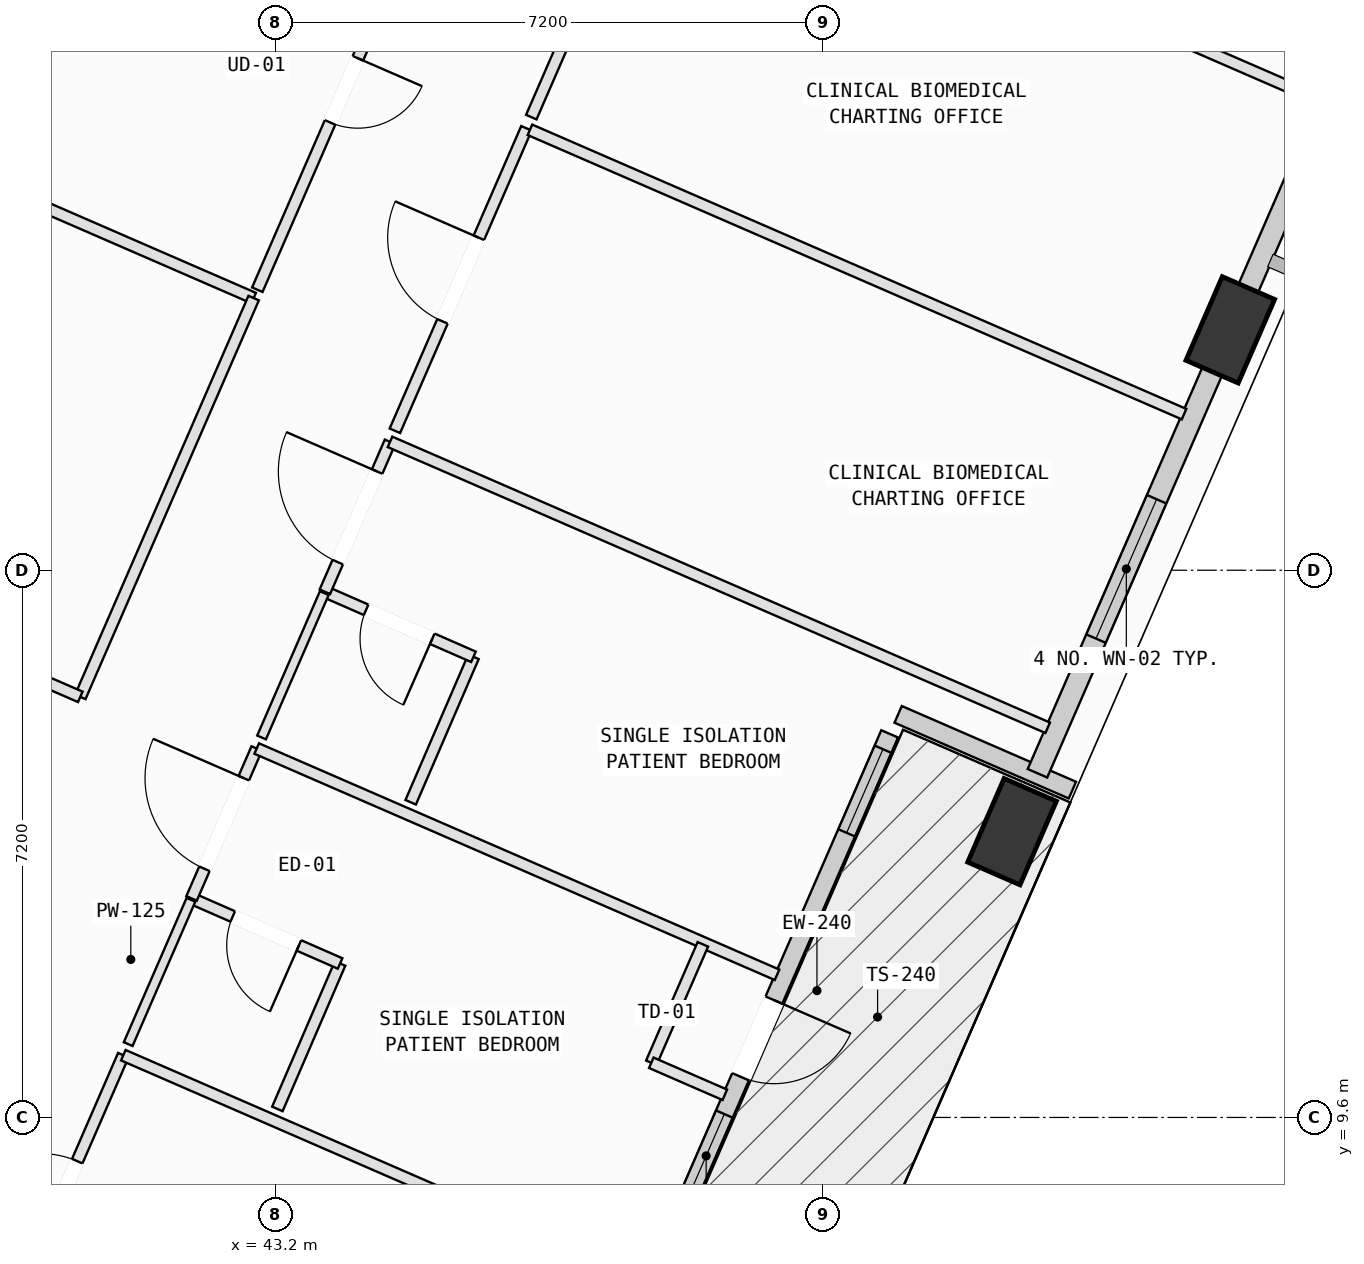
"""IFC4 building model, lengths in metres.
Left out: names, types, materials, properties, quantities, classifications, styles, units other than length and angle.
Written with IfcOpenShell. Run it as: python <this file> out.ifc"""

import sys

from ifc_helpers import new_model, si_unit, direction, frame, frame_2d, origin, origin_2d, place, context, subcontext, project, spatial, rectangle, extrude, element, fill, save


model = new_model("IFC4")
c1 = context("Model", 3, precision=1e-05, world=origin(), true_north=direction((0.0, 1.0)))
c2 = subcontext(c1, "Body", "Model", "MODEL_VIEW")
j1 = project(units=[si_unit("LENGTHUNIT", "METRE"), si_unit("PLANEANGLEUNIT", "RADIAN")], contexts=[c1])
p1 = place(None, origin())
s1 = spatial("IfcSite", under=j1, at=p1, CompositionType="ELEMENT")
p2 = place(p1, origin())
s2 = spatial("IfcBuilding", under=s1, at=p2, CompositionType="ELEMENT")
p3 = place(p2, frame((0.0, 0.0, 324.6)))
s3 = spatial("IfcBuildingStorey", under=s2, at=p3, CompositionType="ELEMENT", Elevation=324.6)
for number, where, z_axis, x_axis in (
    (1, (52.888, 13.36, 0.002), (0.0, 0.0, 1.0), (0.399, 0.917, 0.0)),
    (2, (55.759, 19.963, 0.002), (0.0, 0.0, 1.0), (0.399, 0.917, 0.0)),
):
    element("IfcColumn", number, at=place(p3, frame(where, z_axis=z_axis, x_axis=x_axis)), inside=s3, PredefinedType="COLUMN", context=c2, shape_type="SweptSolid", body=[
        extrude(rectangle(XDim=1.2, YDim=0.75, at=origin_2d()), origin(), (0.0, 0.0, 1.0), 3.996),
    ])
p4 = place(p3, frame((51.278, 14.647, 0.0), z_axis=(0.0, 0.0, 1.0), x_axis=(-0.398727394062, -0.917069498579, 0.0)))
e3 = element("IfcWall", 3, at=p4, inside=s3, PredefinedType="SOLIDWALL", context=c2, shape_type="SweptSolid", body=[
    extrude(rectangle(XDim=6.96, YDim=0.24, at=frame_2d((3.48, 0.0))), origin(), (0.0, 0.0, 1.0), 3.265),
])
p5 = place(p4, frame((3.82, 0.0, 0.0)))
e4 = element("IfcOpeningElement", 4, at=p5, cuts=e3, PredefinedType="OPENING", context=c2, shape_type="SweptSolid", body=[
    extrude(rectangle(XDim=1.1, YDim=2.15, at=frame_2d((0.55, 1.075))), frame((0.0, 0.13, 0.0), z_axis=(0.0, -1.0, 0.0), x_axis=(1.0, 0.0, 0.0)), (0.0, 0.0, 1.0), 0.26),
])
p6 = place(p4, frame((5.455, 0.0, 0.75)))
e5 = element("IfcOpeningElement", 5, at=p6, cuts=e3, PredefinedType="OPENING", context=c2, shape_type="SweptSolid", body=[
    extrude(rectangle(XDim=1.2, YDim=1.75, at=frame_2d((0.6, 0.875))), frame((0.0, 0.13, 0.0), z_axis=(0.0, -1.0, 0.0), x_axis=(1.0, 0.0, 0.0)), (0.0, 0.0, 1.0), 0.26),
])
p7 = place(p4, frame((0.22, 0.0, 0.75)))
e6 = element("IfcOpeningElement", 6, at=p7, cuts=e3, PredefinedType="OPENING", context=c2, shape_type="SweptSolid", body=[
    extrude(rectangle(XDim=1.2, YDim=1.75, at=frame_2d((0.6, 0.875))), frame((0.0, 0.13, 0.0), z_axis=(0.0, -1.0, 0.0), x_axis=(1.0, 0.0, 0.0)), (0.0, 0.0, 1.0), 0.26),
])
p8 = place(p3, frame((53.682, 13.907, 0.0), z_axis=(0.0, 0.0, 1.0), x_axis=(-0.917056081644, 0.398758251475, 0.0)))
e7 = element("IfcWall", 7, at=p8, inside=s3, PredefinedType="SOLIDWALL", context=c2, shape_type="SweptSolid", body=[
    extrude(rectangle(XDim=2.5, YDim=0.24, at=frame_2d((1.25, 0.0))), origin(), (0.0, 0.0, 1.0), 3.265),
])
p9 = place(p3, frame((55.601, 19.598, 0.0), z_axis=(0.0, 0.0, 1.0), x_axis=(-0.398765026274, -0.917053135767, 0.0)))
e8 = element("IfcWall", 8, at=p9, inside=s3, PredefinedType="SOLIDWALL", context=c2, shape_type="SweptSolid", body=[
    extrude(rectangle(XDim=5.964, YDim=0.28, at=frame_2d((2.982, 0.0))), origin(), (0.0, 0.0, 1.0), 3.265),
])
p10 = place(p9, frame((2.032, 0.0, 0.75)))
e9 = element("IfcOpeningElement", 9, at=p10, cuts=e8, PredefinedType="OPENING", context=c2, shape_type="SweptSolid", body=[
    extrude(rectangle(XDim=2.0, YDim=1.95, at=frame_2d((1.0, 0.975))), frame((0.0, 0.15, 0.0), z_axis=(0.0, -1.0, 0.0), x_axis=(1.0, 0.0, 0.0)), (0.0, 0.0, 1.0), 0.3),
])
p11 = place(p3, frame((58.472, 26.201, 0.0), z_axis=(0.0, 0.0, 1.0), x_axis=(-0.398776286617, -0.917048239316, 0.0)))
e10 = element("IfcWall", 10, at=p11, inside=s3, PredefinedType="SOLIDWALL", context=c2, shape_type="SweptSolid", body=[
    extrude(rectangle(XDim=6.405, YDim=0.28, at=frame_2d((3.203, 0.0))), origin(), (0.0, 0.0, 1.0), 3.265),
])
p12 = place(p11, frame((0.896, 0.0, 0.75)))
e11 = element("IfcOpeningElement", 11, at=p12, cuts=e10, PredefinedType="OPENING", context=c2, shape_type="SweptSolid", body=[
    extrude(rectangle(XDim=1.4, YDim=1.85, at=frame_2d((0.7, 0.925))), frame((0.0, 0.15, 0.0), z_axis=(0.0, -1.0, 0.0), x_axis=(1.0, 0.0, 0.0)), (0.0, 0.0, 1.0), 0.3),
])
p13 = place(p3, frame((39.505, 6.53, 0.0), z_axis=(0.0, 0.0, 1.0), x_axis=(0.398597683129, 0.917125883946, 0.0)))
e12 = element("IfcWall", 12, at=p13, inside=s3, PredefinedType="PARTITIONING", context=c2, shape_type="SweptSolid", body=[
    extrude(rectangle(XDim=4.24, YDim=0.15, at=frame_2d((2.12, 0.0))), origin(), (0.0, 0.0, 1.0), 3.78),
])
p14 = place(p13, frame((1.52, 0.0, 0.0)))
e13 = element("IfcOpeningElement", 13, at=p14, cuts=e12, PredefinedType="OPENING", context=c2, shape_type="SweptSolid", body=[
    extrude(rectangle(XDim=1.2, YDim=2.15, at=frame_2d((0.6, 1.075))), frame((0.0, 0.085, 0.0), z_axis=(0.0, -1.0, 0.0), x_axis=(1.0, 0.0, 0.0)), (0.0, 0.0, 1.0), 0.17),
])
p15 = place(p3, frame((41.195, 10.419, 0.0), z_axis=(0.0, 0.0, 1.0), x_axis=(0.917057356127, -0.398755320434, 0.0)))
e14 = element("IfcWall", 14, at=p15, inside=s3, PredefinedType="PARTITIONING", context=c2, shape_type="SweptSolid", body=[
    extrude(rectangle(XDim=9.78, YDim=0.15, at=frame_2d((4.89, 0.0))), origin(), (0.0, 0.0, 1.0), 2.765),
])
p16 = place(p3, frame((43.222, 9.712, 0.0), z_axis=(0.0, 0.0, 1.0), x_axis=(0.395897468888, 0.918294720734, 0.0)))
e15 = element("IfcWall", 15, at=p16, inside=s3, PredefinedType="PARTITIONING", context=c2, shape_type="SweptSolid", body=[
    extrude(rectangle(XDim=2.084, YDim=0.15, at=frame_2d((1.042, 0.0))), origin(), (0.0, 0.0, 1.0), 3.415),
])
p17 = place(p3, frame((44.047, 11.626, 0.0), z_axis=(0.0, 0.0, 1.0), x_axis=(-0.915978642335, 0.40122702649, 0.0)))
e16 = element("IfcWall", 16, at=p17, inside=s3, PredefinedType="PARTITIONING", context=c2, shape_type="SweptSolid", body=[
    extrude(rectangle(XDim=2.133, YDim=0.15, at=frame_2d((1.067, 0.0))), origin(), (0.0, 0.0, 1.0), 3.78),
])
p18 = place(p17, frame((0.592, 0.0, 0.0)))
e17 = element("IfcOpeningElement", 17, at=p18, cuts=e16, PredefinedType="OPENING", context=c2, shape_type="SweptSolid", body=[
    extrude(rectangle(XDim=0.95, YDim=2.1, at=frame_2d((0.475, 1.05))), frame((0.0, 0.085, 0.0), z_axis=(0.0, -1.0, 0.0), x_axis=(1.0, 0.0, 0.0)), (0.0, 0.0, 1.0), 0.17),
])
p19 = place(p3, frame((42.093, 12.482, 0.0), z_axis=(0.0, 0.0, 1.0), x_axis=(0.398518519728, 0.917160285574, 0.0)))
e18 = element("IfcWall", 18, at=p19, inside=s3, PredefinedType="PARTITIONING", context=c2, shape_type="SweptSolid", body=[
    extrude(rectangle(XDim=2.15, YDim=0.15, at=frame_2d((1.075, 0.0))), origin(), (0.0, 0.0, 1.0), 3.78),
])
p20 = place(p19, frame((0.425, 0.0, 0.0)))
e19 = element("IfcOpeningElement", 19, at=p20, cuts=e18, PredefinedType="OPENING", context=c2, shape_type="SweptSolid", body=[
    extrude(rectangle(XDim=1.3, YDim=2.15, at=frame_2d((0.65, 1.075))), frame((0.0, 0.085, 0.0), z_axis=(0.0, -1.0, 0.0), x_axis=(1.0, 0.0, 0.0)), (0.0, 0.0, 1.0), 0.17),
])
p21 = place(p3, frame((42.95, 14.454, 0.0), z_axis=(0.0, 0.0, 1.0), x_axis=(0.917043017742, -0.398788294224, 0.0)))
e20 = element("IfcWall", 20, at=p21, inside=s3, PredefinedType="PARTITIONING", context=c2, shape_type="SweptSolid", body=[
    extrude(rectangle(XDim=7.465, YDim=0.15, at=frame_2d((3.733, 0.0))), origin(), (0.0, 0.0, 1.0), 3.78),
])
p22 = place(p3, frame((48.82, 11.878, 0.0), z_axis=(0.0, 0.0, 1.0), x_axis=(-0.398836393262, -0.917022099739, 0.0)))
e21 = element("IfcWall", 21, at=p22, inside=s3, PredefinedType="PARTITIONING", context=c2, shape_type="SweptSolid", body=[
    extrude(rectangle(XDim=1.7, YDim=0.15, at=frame_2d((0.85, 0.0))), origin(), (0.0, 0.0, 1.0), 3.78),
])
p23 = place(p3, frame((48.142, 10.319, 0.0), z_axis=(0.0, 0.0, 1.0), x_axis=(0.916793786887, -0.399360929894, 0.0)))
e22 = element("IfcWall", 22, at=p23, inside=s3, PredefinedType="PARTITIONING", context=c2, shape_type="SweptSolid", body=[
    extrude(rectangle(XDim=1.054, YDim=0.15, at=frame_2d((0.527, 0.0))), origin(), (0.0, 0.0, 1.0), 3.78),
])
p24 = place(p3, frame((41.259, 10.565, 0.0), z_axis=(0.0, 0.0, 1.0), x_axis=(0.398808011477, 0.917034443182, 0.0)))
e23 = element("IfcWall", 23, at=p24, inside=s3, PredefinedType="PARTITIONING", context=c2, shape_type="SweptSolid", body=[
    extrude(rectangle(XDim=2.071, YDim=0.125, at=frame_2d((1.036, 0.0))), origin(), (0.0, 0.0, 1.0), 3.78),
])
p25 = place(p3, frame((44.976, 13.747, 0.0), z_axis=(0.0, 0.0, 1.0), x_axis=(0.396236327193, 0.918148557159, 0.0)))
e24 = element("IfcWall", 24, at=p25, inside=s3, PredefinedType="PARTITIONING", context=c2, shape_type="SweptSolid", body=[
    extrude(rectangle(XDim=2.084, YDim=0.15, at=frame_2d((1.042, 0.0))), origin(), (0.0, 0.0, 1.0), 3.78),
])
p26 = place(p3, frame((45.802, 15.661, 0.0), z_axis=(0.0, 0.0, 1.0), x_axis=(-0.916010257987, 0.401154842003, 0.0)))
e25 = element("IfcWall", 25, at=p26, inside=s3, PredefinedType="PARTITIONING", context=c2, shape_type="SweptSolid", body=[
    extrude(rectangle(XDim=2.134, YDim=0.15, at=frame_2d((1.067, 0.0))), origin(), (0.0, 0.0, 1.0), 3.78),
])
p27 = place(p26, frame((0.592, 0.0, 0.0)))
e26 = element("IfcOpeningElement", 26, at=p27, cuts=e25, PredefinedType="OPENING", context=c2, shape_type="SweptSolid", body=[
    extrude(rectangle(XDim=0.95, YDim=2.1, at=frame_2d((0.475, 1.05))), frame((0.0, 0.085, 0.0), z_axis=(0.0, -1.0, 0.0), x_axis=(1.0, 0.0, 0.0)), (0.0, 0.0, 1.0), 0.17),
])
p28 = place(p3, frame((43.847, 16.517, 0.0), z_axis=(0.0, 0.0, 1.0), x_axis=(0.398655528378, 0.917100741301, 0.0)))
e27 = element("IfcWall", 27, at=p28, inside=s3, PredefinedType="PARTITIONING", context=c2, shape_type="SweptSolid", body=[
    extrude(rectangle(XDim=2.15, YDim=0.15, at=frame_2d((1.075, 0.0))), origin(), (0.0, 0.0, 1.0), 3.78),
])
p29 = place(p28, frame((0.425, 0.0, 0.0)))
e28 = element("IfcOpeningElement", 28, at=p29, cuts=e27, PredefinedType="OPENING", context=c2, shape_type="SweptSolid", body=[
    extrude(rectangle(XDim=1.3, YDim=2.15, at=frame_2d((0.65, 1.075))), frame((0.0, 0.085, 0.0), z_axis=(0.0, -1.0, 0.0), x_axis=(1.0, 0.0, 0.0)), (0.0, 0.0, 1.0), 0.17),
])
p30 = place(p3, frame((44.704, 18.489, 0.0), z_axis=(0.0, 0.0, 1.0), x_axis=(0.917075404025, -0.398713811315, 0.0)))
e29 = element("IfcWall", 29, at=p30, inside=s3, PredefinedType="PARTITIONING", context=c2, shape_type="SweptSolid", body=[
    extrude(rectangle(XDim=9.435, YDim=0.15, at=frame_2d((4.718, 0.0))), origin(), (0.0, 0.0, 1.0), 3.78),
])
p31 = place(p3, frame((43.014, 14.6, 0.0), z_axis=(0.0, 0.0, 1.0), x_axis=(0.398553636867, 0.917145025904, 0.0)))
e30 = element("IfcWall", 30, at=p31, inside=s3, PredefinedType="PARTITIONING", context=c2, shape_type="SweptSolid", body=[
    extrude(rectangle(XDim=2.071, YDim=0.125, at=frame_2d((1.035, 0.0))), origin(), (0.0, 0.0, 1.0), 3.78),
])
p32 = place(p3, frame((44.768, 18.635, 0.0), z_axis=(0.0, 0.0, 1.0), x_axis=(0.398828954963, 0.91702533481, 0.0)))
e31 = element("IfcWall", 31, at=p32, inside=s3, PredefinedType="PARTITIONING", context=c2, shape_type="SweptSolid", body=[
    extrude(rectangle(XDim=4.34, YDim=0.15, at=frame_2d((2.17, 0.0))), origin(), (0.0, 0.0, 1.0), 3.415),
])
p33 = place(p32, frame((1.57, 0.0, 0.0)))
e32 = element("IfcOpeningElement", 32, at=p33, cuts=e31, PredefinedType="OPENING", context=c2, shape_type="SweptSolid", body=[
    extrude(rectangle(XDim=1.2, YDim=2.15, at=frame_2d((0.6, 1.075))), frame((0.0, 0.085, 0.0), z_axis=(0.0, -1.0, 0.0), x_axis=(1.0, 0.0, 0.0)), (0.0, 0.0, 1.0), 0.17),
])
p34 = place(p3, frame((46.545, 22.595, 0.0), z_axis=(0.0, 0.0, 1.0), x_axis=(0.917099421132, -0.39865856539, 0.0)))
e33 = element("IfcWall", 33, at=p34, inside=s3, PredefinedType="PARTITIONING", context=c2, shape_type="SweptSolid", body=[
    extrude(rectangle(XDim=9.384, YDim=0.15, at=frame_2d((4.692, 0.0))), origin(), (0.0, 0.0, 1.0), 3.78),
])
p35 = place(p3, frame((46.563, 22.762, 0.0), z_axis=(0.0, 0.0, 1.0), x_axis=(0.398639711207, 0.917107616722, 0.0)))
e34 = element("IfcWall", 34, at=p35, inside=s3, PredefinedType="PARTITIONING", context=c2, shape_type="SweptSolid", body=[
    extrude(rectangle(XDim=4.34, YDim=0.15, at=frame_2d((2.17, 0.0))), origin(), (0.0, 0.0, 1.0), 3.415),
])
p36 = place(p35, frame((1.57, 0.0, 0.0)))
e35 = element("IfcOpeningElement", 35, at=p36, cuts=e34, PredefinedType="OPENING", context=c2, shape_type="SweptSolid", body=[
    extrude(rectangle(XDim=1.2, YDim=2.15, at=frame_2d((0.6, 1.075))), frame((0.0, 0.085, 0.0), z_axis=(0.0, -1.0, 0.0), x_axis=(1.0, 0.0, 0.0)), (0.0, 0.0, 1.0), 0.17),
])
p37 = place(p3, frame((48.293, 26.742, 0.0), z_axis=(0.0, 0.0, 1.0), x_axis=(0.917063062267, -0.398742197197, 0.0)))
e36 = element("IfcWall", 36, at=p37, inside=s3, PredefinedType="PARTITIONING", context=c2, shape_type="SweptSolid", body=[
    extrude(rectangle(XDim=9.435, YDim=0.15, at=frame_2d((4.717, 0.0))), origin(), (0.0, 0.0, 1.0), 3.78),
])
p38 = place(p3, frame((56.128, 20.236, 0.0), z_axis=(0.0, 0.0, 1.0), x_axis=(-0.398658726612, -0.91709935105, 0.0)))
e37 = element("IfcWall", 37, at=p38, inside=s3, PredefinedType="PARTITIONING", context=c2, shape_type="SweptSolid", body=[
    extrude(rectangle(XDim=0.795, YDim=0.15, at=frame_2d((0.397, 0.0))), origin(), (0.0, 0.0, 1.0), 3.265),
])
p39 = place(p3, frame((34.808, 23.904, 0.0), z_axis=(0.0, 0.0, 1.0), x_axis=(0.917052481723, -0.398766530398, 0.0)))
e38 = element("IfcWall", 38, at=p39, inside=s3, PredefinedType="PARTITIONING", context=c2, shape_type="SweptSolid", body=[
    extrude(rectangle(XDim=8.835, YDim=0.15, at=frame_2d((4.417, 0.0))), origin(), (0.0, 0.0, 1.0), 3.78),
])
p40 = place(p3, frame((42.91, 20.381, 0.0), z_axis=(0.0, 0.0, 1.0), x_axis=(-0.398677741034, -0.917091085337, 0.0)))
e39 = element("IfcWall", 39, at=p40, inside=s3, PredefinedType="PARTITIONING", context=c2, shape_type="SweptSolid", body=[
    extrude(rectangle(XDim=5.721, YDim=0.15, at=frame_2d((2.861, 0.0))), origin(), (0.0, 0.0, 1.0), 3.78),
])
p41 = place(p3, frame((40.629, 15.134, 0.0), z_axis=(0.0, 0.0, 1.0), x_axis=(-0.916933705125, 0.399039572481, 0.0)))
e40 = element("IfcWall", 40, at=p41, inside=s3, PredefinedType="PARTITIONING", context=c2, shape_type="SweptSolid", body=[
    extrude(rectangle(XDim=1.253, YDim=0.15, at=frame_2d((0.626, 0.0))), origin(), (0.0, 0.0, 1.0), 3.78),
])
p42 = place(p3, frame((45.239, 25.738, 0.0), z_axis=(0.0, 0.0, 1.0), x_axis=(-0.398677741034, -0.917091085337, 0.0)))
e41 = element("IfcWall", 41, at=p42, inside=s3, PredefinedType="PARTITIONING", context=c2, shape_type="SweptSolid", body=[
    extrude(rectangle(XDim=5.721, YDim=0.15, at=frame_2d((2.861, 0.0))), origin(), (0.0, 0.0, 1.0), 3.78),
])
p43 = place(p42, frame((2.401, 0.0, 0.0)))
e42 = element("IfcOpeningElement", 42, at=p43, cuts=e41, PredefinedType="OPENING", context=c2, shape_type="SweptSolid", body=[
    extrude(rectangle(XDim=0.92, YDim=2.1, at=frame_2d((0.46, 1.05))), frame((0.0, 0.085, 0.0), z_axis=(0.0, -1.0, 0.0), x_axis=(1.0, 0.0, 0.0)), (0.0, 0.0, 1.0), 0.17),
])
p44 = place(p5, origin())
e43 = element("IfcDoor", 43, at=p44, inside=s3, OperationType="SINGLE_SWING_LEFT", PredefinedType="DOOR", context=c2, shape_type="SweptSolid", body=[
    extrude(rectangle(XDim=1.1, YDim=2.15, at=frame_2d((0.55, 1.075))), frame((0.0, 0.025, 0.0), z_axis=(0.0, -1.0, 0.0), x_axis=(1.0, 0.0, 0.0)), (0.0, 0.0, 1.0), 0.05),
])
fill(e4, e43)
p45 = place(p6, origin())
e44 = element("IfcWindow", 44, at=p45, inside=s3, PartitioningType="SINGLE_PANEL", PredefinedType="WINDOW", context=c2, shape_type="SweptSolid", body=[
    extrude(rectangle(XDim=1.2, YDim=1.75, at=frame_2d((0.6, 0.875))), frame((0.0, 0.03, 0.0), z_axis=(0.0, -1.0, 0.0), x_axis=(1.0, 0.0, 0.0)), (0.0, 0.0, 1.0), 0.06),
])
fill(e5, e44)
p46 = place(p7, origin())
e45 = element("IfcWindow", 45, at=p46, inside=s3, PartitioningType="SINGLE_PANEL", PredefinedType="WINDOW", context=c2, shape_type="SweptSolid", body=[
    extrude(rectangle(XDim=1.2, YDim=1.75, at=frame_2d((0.6, 0.875))), frame((0.0, 0.03, 0.0), z_axis=(0.0, -1.0, 0.0), x_axis=(1.0, 0.0, 0.0)), (0.0, 0.0, 1.0), 0.06),
])
fill(e6, e45)
p47 = place(p10, origin())
e46 = element("IfcWindow", 46, at=p47, inside=s3, PartitioningType="SINGLE_PANEL", PredefinedType="WINDOW", context=c2, shape_type="SweptSolid", body=[
    extrude(rectangle(XDim=2.0, YDim=1.95, at=frame_2d((1.0, 0.975))), frame((0.0, 0.03, 0.0), z_axis=(0.0, -1.0, 0.0), x_axis=(1.0, 0.0, 0.0)), (0.0, 0.0, 1.0), 0.06),
])
fill(e9, e46)
p48 = place(p14, origin())
e47 = element("IfcDoor", 47, at=p48, inside=s3, OperationType="SINGLE_SWING_LEFT", PredefinedType="DOOR", context=c2, shape_type="SweptSolid", body=[
    extrude(rectangle(XDim=1.2, YDim=2.15, at=frame_2d((0.6, 1.075))), frame((0.0, 0.025, 0.0), z_axis=(0.0, -1.0, 0.0), x_axis=(1.0, 0.0, 0.0)), (0.0, 0.0, 1.0), 0.05),
])
fill(e13, e47)
p49 = place(p20, origin())
e48 = element("IfcDoor", 48, at=p49, inside=s3, OperationType="SINGLE_SWING_RIGHT", PredefinedType="DOOR", context=c2, shape_type="SweptSolid", body=[
    extrude(rectangle(XDim=1.3, YDim=2.15, at=frame_2d((0.65, 1.075))), frame((0.0, 0.025, 0.0), z_axis=(0.0, -1.0, 0.0), x_axis=(1.0, 0.0, 0.0)), (0.0, 0.0, 1.0), 0.05),
])
fill(e19, e48)
p50 = place(p18, origin())
e49 = element("IfcDoor", 49, at=p50, inside=s3, OperationType="SINGLE_SWING_LEFT", PredefinedType="DOOR", context=c2, shape_type="SweptSolid", body=[
    extrude(rectangle(XDim=0.95, YDim=2.1, at=frame_2d((0.475, 1.05))), frame((0.0, 0.025, 0.0), z_axis=(0.0, -1.0, 0.0), x_axis=(1.0, 0.0, 0.0)), (0.0, 0.0, 1.0), 0.05),
])
fill(e17, e49)
p51 = place(p29, origin())
e50 = element("IfcDoor", 50, at=p51, inside=s3, OperationType="SINGLE_SWING_RIGHT", PredefinedType="DOOR", context=c2, shape_type="SweptSolid", body=[
    extrude(rectangle(XDim=1.3, YDim=2.15, at=frame_2d((0.65, 1.075))), frame((0.0, 0.025, 0.0), z_axis=(0.0, -1.0, 0.0), x_axis=(1.0, 0.0, 0.0)), (0.0, 0.0, 1.0), 0.05),
])
fill(e28, e50)
p52 = place(p27, origin())
e51 = element("IfcDoor", 51, at=p52, inside=s3, OperationType="SINGLE_SWING_LEFT", PredefinedType="DOOR", context=c2, shape_type="SweptSolid", body=[
    extrude(rectangle(XDim=0.95, YDim=2.1, at=frame_2d((0.475, 1.05))), frame((0.0, 0.025, 0.0), z_axis=(0.0, -1.0, 0.0), x_axis=(1.0, 0.0, 0.0)), (0.0, 0.0, 1.0), 0.05),
])
fill(e26, e51)
p53 = place(p33, origin())
e52 = element("IfcDoor", 52, at=p53, inside=s3, OperationType="SINGLE_SWING_RIGHT", PredefinedType="DOOR", context=c2, shape_type="SweptSolid", body=[
    extrude(rectangle(XDim=1.2, YDim=2.15, at=frame_2d((0.6, 1.075))), frame((0.0, 0.025, 0.0), z_axis=(0.0, -1.0, 0.0), x_axis=(1.0, 0.0, 0.0)), (0.0, 0.0, 1.0), 0.05),
])
fill(e32, e52)
p54 = place(p43, origin())
e53 = element("IfcDoor", 53, at=p54, inside=s3, OperationType="SINGLE_SWING_LEFT", PredefinedType="DOOR", context=c2, shape_type="SweptSolid", body=[
    extrude(rectangle(XDim=0.92, YDim=2.1, at=frame_2d((0.46, 1.05))), frame((0.0, 0.025, 0.0), z_axis=(0.0, -1.0, 0.0), x_axis=(1.0, 0.0, 0.0)), (0.0, 0.0, 1.0), 0.05),
])
fill(e42, e53)
save(model, sys.argv[1])
